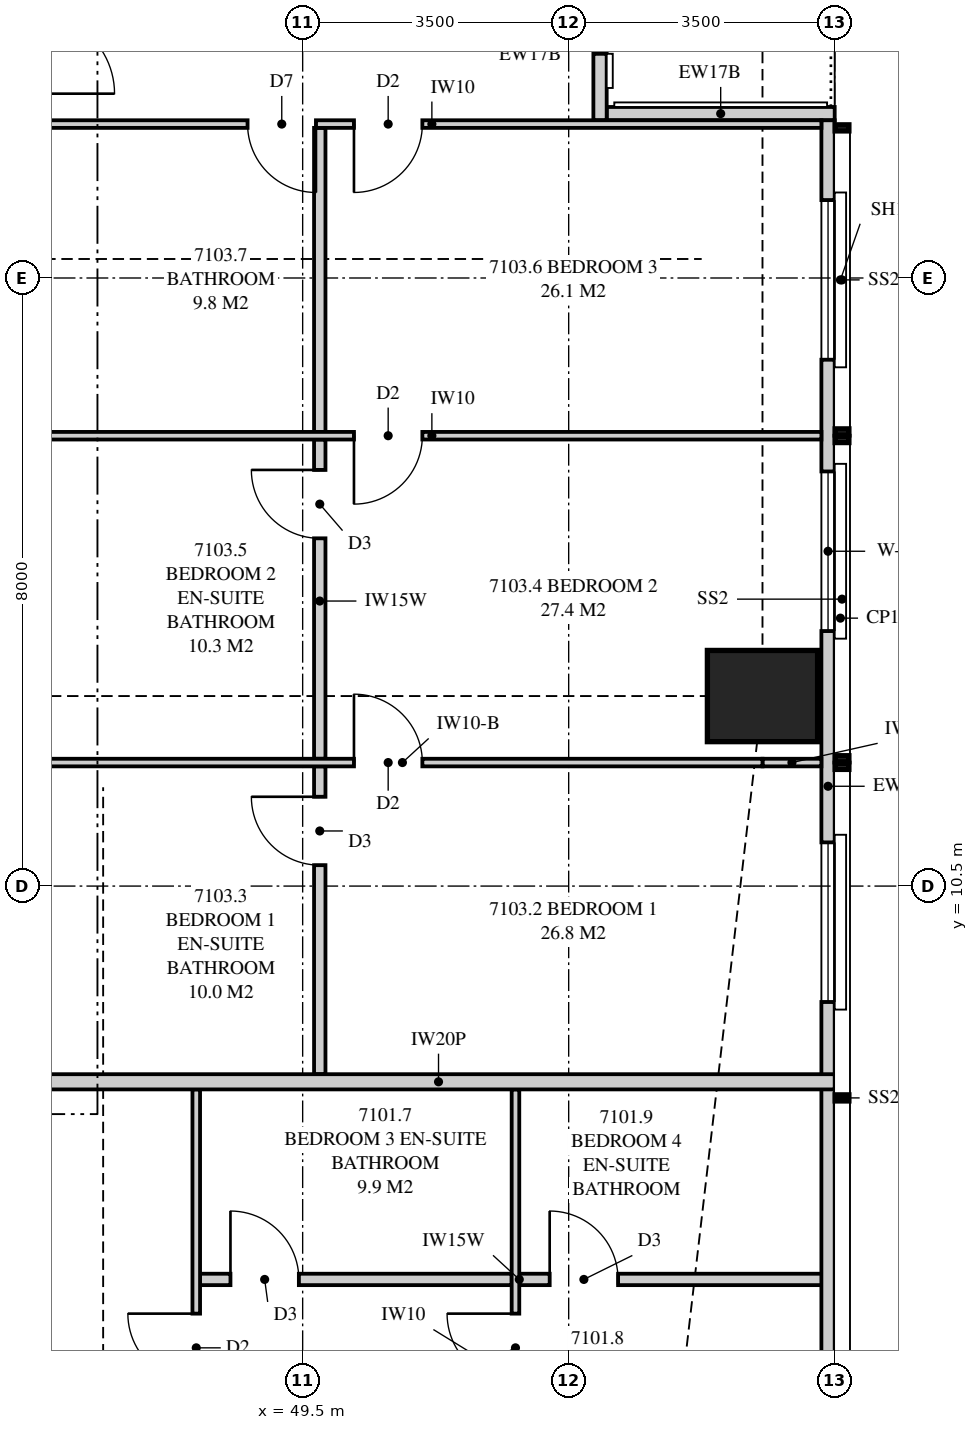
"""IFC4 building model, lengths in metres.
Left out: names, types, materials, properties, quantities, classifications, styles, units other than length and angle.
Written with IfcOpenShell. Run it as: python <this file> out.ifc"""

import sys

from ifc_helpers import new_model, si_unit, direction, frame, frame_2d, origin, origin_2d, place, context, subcontext, project, spatial, polyline, rectangle, outline, extrude, element, fill, save


model = new_model("IFC4")
c1 = context("Model", 3, precision=1e-05, world=origin(), true_north=direction((0.0, 1.0)))
c2 = subcontext(c1, "Body", "Model", "MODEL_VIEW")
j1 = project(units=[si_unit("LENGTHUNIT", "METRE"), si_unit("PLANEANGLEUNIT", "RADIAN")], contexts=[c1])
p1 = place(None, origin())
s1 = spatial("IfcSite", under=j1, at=p1, CompositionType="ELEMENT")
p2 = place(p1, origin())
s2 = spatial("IfcBuilding", under=s1, at=p2, CompositionType="ELEMENT")
p3 = place(p2, frame((0.0, 0.0, 259.95)))
s3 = spatial("IfcBuildingStorey", under=s2, at=p3, CompositionType="ELEMENT", Elevation=259.95)
p4 = place(p3, frame((55.55, 13.0, 0.0), z_axis=(0.0, 0.0, 1.0), x_axis=(1.0, 0.0, 0.0)))
e1 = element("IfcColumn", 1, at=p4, inside=s3, PredefinedType="COLUMN", context=c2, shape_type="SweptSolid", body=[
    extrude(rectangle(XDim=1.45, YDim=1.2, at=origin_2d()), origin(), (0.0, 0.0, 1.0), 3.9),
])
p5 = place(p3, frame((56.413, 3.051, 0.0), z_axis=(0.0, 0.0, 1.0), x_axis=(0.0, 1.0, 0.0)))
e2 = element("IfcWall", 2, at=p5, inside=s3, PredefinedType="SOLIDWALL", context=c2, shape_type="SweptSolid", body=[
    extrude(outline(polyline([(0.0, 0.0), (17.524, 0.0), (17.524, 2.7), (9.949, 2.7), (9.949, 3.66), (9.858, 3.66), (9.858, 2.7), (9.688, 2.7), (9.688, 3.66), (0.0, 3.66), (0.0, 0.0)])), frame((0.0, 0.087, 0.0), z_axis=(0.0, -1.0, 0.0), x_axis=(1.0, 0.0, 0.0)), (0.0, 0.0, 1.0), 0.175),
])
p6 = place(p5, frame((5.924, 0.0, 0.4)))
e3 = element("IfcOpeningElement", 3, at=p6, cuts=e2, PredefinedType="OPENING", context=c2, shape_type="SweptSolid", body=[
    extrude(rectangle(XDim=2.1, YDim=2.25, at=frame_2d((1.05, 1.125))), frame((0.0, 0.097, 0.0), z_axis=(0.0, -1.0, 0.0), x_axis=(1.0, 0.0, 0.0)), (0.0, 0.0, 1.0), 0.195),
])
p7 = place(p5, frame((10.804, 0.0, 0.4)))
e4 = element("IfcOpeningElement", 4, at=p7, cuts=e2, PredefinedType="OPENING", context=c2, shape_type="SweptSolid", body=[
    extrude(rectangle(XDim=2.1, YDim=2.25, at=frame_2d((1.05, 1.125))), frame((0.0, 0.097, 0.0), z_axis=(0.0, -1.0, 0.0), x_axis=(1.0, 0.0, 0.0)), (0.0, 0.0, 1.0), 0.195),
])
p8 = place(p5, frame((14.374, 0.0, 0.4)))
e5 = element("IfcOpeningElement", 5, at=p8, cuts=e2, PredefinedType="OPENING", context=c2, shape_type="SweptSolid", body=[
    extrude(rectangle(XDim=2.1, YDim=2.25, at=frame_2d((1.05, 1.125))), frame((0.0, 0.097, 0.0), z_axis=(0.0, -1.0, 0.0), x_axis=(1.0, 0.0, 0.0)), (0.0, 0.0, 1.0), 0.195),
])
p9 = place(p3, frame((53.413, 20.575, 0.0), z_axis=(0.0, 0.0, 1.0), x_axis=(0.0, 1.0, 0.0)))
e6 = element("IfcWall", 6, at=p9, inside=s3, PredefinedType="SOLIDWALL", context=c2, shape_type="SweptSolid", body=[
    extrude(outline(polyline([(0.0, 0.0), (3.55, 0.0), (3.55, 3.06), (3.225, 3.06), (3.225, 3.66), (0.0, 3.66), (0.0, 0.0)])), frame((0.0, 0.087, 0.0), z_axis=(0.0, -1.0, 0.0), x_axis=(1.0, 0.0, 0.0)), (0.0, 0.0, 1.0), 0.175),
])
p10 = place(p9, frame((0.875, 0.0, 0.0)))
e7 = element("IfcOpeningElement", 7, at=p10, cuts=e6, PredefinedType="OPENING", context=c2, shape_type="SweptSolid", body=[
    extrude(rectangle(XDim=1.8, YDim=2.4, at=frame_2d((0.9, 1.2))), frame((0.0, 0.097, 0.0), z_axis=(0.0, -1.0, 0.0), x_axis=(1.0, 0.0, 0.0)), (0.0, 0.0, 1.0), 0.195),
])
p11 = place(p3, frame((56.5, 20.663, 0.0), z_axis=(0.0, 0.0, 1.0), x_axis=(-1.0, 0.0, 0.0)))
e8 = element("IfcWall", 8, at=p11, inside=s3, PredefinedType="SOLIDWALL", context=c2, shape_type="SweptSolid", body=[
    extrude(outline(polyline([(0.0, 0.0), (3.0, 0.0), (3.0, 3.66), (1.75, 3.66), (1.75, 2.7), (0.15, 2.7), (0.15, 3.66), (0.0, 3.66), (0.0, 0.0)])), frame((0.0, 0.087, 0.0), z_axis=(0.0, -1.0, 0.0), x_axis=(1.0, 0.0, 0.0)), (0.0, 0.0, 1.0), 0.175),
])
p12 = place(p3, frame((48.1, 0.175, 0.0), z_axis=(0.0, 0.0, 1.0), x_axis=(0.0, 1.0, 0.0)))
e9 = element("IfcWall", 9, at=p12, inside=s3, PredefinedType="PARTITIONING", context=c2, shape_type="SweptSolid", body=[
    extrude(outline(polyline([(0.0, 0.0), (7.65, 0.0), (7.65, 3.66), (7.65, 3.06), (1.855, 3.06), (1.855, 2.7), (0.11, 2.7), (0.11, 3.66), (0.0, 3.66), (0.0, 0.0)])), frame((0.0, 0.05, 0.0), z_axis=(0.0, -1.0, 0.0), x_axis=(1.0, 0.0, 0.0)), (0.0, 0.0, 1.0), 0.1),
])
p13 = place(p12, frame((3.8, 0.0, 0.0)))
e10 = element("IfcOpeningElement", 10, at=p13, cuts=e9, PredefinedType="OPENING", context=c2, shape_type="SweptSolid", body=[
    extrude(rectangle(XDim=0.9, YDim=2.1, at=frame_2d((0.45, 1.05))), frame((0.0, 0.06, 0.0), z_axis=(0.0, -1.0, 0.0), x_axis=(1.0, 0.0, 0.0)), (0.0, 0.0, 1.0), 0.12),
])
p14 = place(p3, frame((52.3, 0.175, 0.0), z_axis=(0.0, 0.0, 1.0), x_axis=(0.0, 1.0, 0.0)))
e11 = element("IfcWall", 11, at=p14, inside=s3, PredefinedType="PARTITIONING", context=c2, shape_type="SweptSolid", body=[
    extrude(outline(polyline([(0.0, 0.0), (7.65, 0.0), (7.65, 3.66), (2.567, 3.66), (2.567, 2.7), (0.822, 2.7), (0.822, 3.66), (0.0, 3.66), (0.0, 0.0)])), frame((0.0, 0.05, 0.0), z_axis=(0.0, -1.0, 0.0), x_axis=(1.0, 0.0, 0.0)), (0.0, 0.0, 1.0), 0.1),
])
p15 = place(p14, frame((3.8, 0.0, 0.0)))
e12 = element("IfcOpeningElement", 12, at=p15, cuts=e11, PredefinedType="OPENING", context=c2, shape_type="SweptSolid", body=[
    extrude(rectangle(XDim=0.9, YDim=2.1, at=frame_2d((0.45, 1.05))), frame((0.0, 0.06, 0.0), z_axis=(0.0, -1.0, 0.0), x_axis=(1.0, 0.0, 0.0)), (0.0, 0.0, 1.0), 0.12),
])
p16 = place(p3, frame((48.15, 5.325, 0.0), z_axis=(0.0, 0.0, 1.0), x_axis=(1.0, 0.0, 0.0)))
e13 = element("IfcWall", 13, at=p16, inside=s3, PredefinedType="PLUMBINGWALL", context=c2, shape_type="SweptSolid", body=[
    extrude(outline(polyline([(0.0, 0.0), (4.1, 0.0), (4.1, 3.66), (0.01, 3.66), (0.01, 3.06), (0.0, 3.06), (0.0, 3.66), (0.0, 0.0)])), frame((0.0, 0.075, 0.0), z_axis=(0.0, -1.0, 0.0), x_axis=(1.0, 0.0, 0.0)), (0.0, 0.0, 1.0), 0.15),
])
p17 = place(p16, frame((0.4, 0.0, 0.0)))
e14 = element("IfcOpeningElement", 14, at=p17, cuts=e13, PredefinedType="OPENING", context=c2, shape_type="SweptSolid", body=[
    extrude(rectangle(XDim=0.9, YDim=2.1, at=frame_2d((0.45, 1.05))), frame((0.0, 0.085, 0.0), z_axis=(0.0, -1.0, 0.0), x_axis=(1.0, 0.0, 0.0)), (0.0, 0.0, 1.0), 0.17),
])
p18 = place(p3, frame((52.35, 5.325, 0.0), z_axis=(0.0, 0.0, 1.0), x_axis=(1.0, 0.0, 0.0)))
e15 = element("IfcWall", 15, at=p18, inside=s3, PredefinedType="PLUMBINGWALL", context=c2, shape_type="SweptSolid", body=[
    extrude(outline(polyline([(0.0, 0.0), (4.15, 0.0), (4.15, 3.66), (3.197, 3.66), (3.197, 2.7), (1.415, 2.7), (1.415, 3.66), (0.0, 3.66), (0.0, 0.0)])), frame((0.0, 0.075, 0.0), z_axis=(0.0, -1.0, 0.0), x_axis=(1.0, 0.0, 0.0)), (0.0, 0.0, 1.0), 0.15),
])
p19 = place(p18, frame((0.4, 0.0, 0.0)))
e16 = element("IfcOpeningElement", 16, at=p19, cuts=e15, PredefinedType="OPENING", context=c2, shape_type="SweptSolid", body=[
    extrude(rectangle(XDim=0.9, YDim=2.1, at=frame_2d((0.45, 1.05))), frame((0.0, 0.085, 0.0), z_axis=(0.0, -1.0, 0.0), x_axis=(1.0, 0.0, 0.0)), (0.0, 0.0, 1.0), 0.17),
])
p20 = place(p3, frame((46.075, 7.925, 0.0), z_axis=(0.0, 0.0, 1.0), x_axis=(1.0, 0.0, 0.0)))
e17 = element("IfcWall", 17, at=p20, inside=s3, PredefinedType="PARTITIONING", context=c2, shape_type="SweptSolid", body=[
    extrude(outline(polyline([(0.0, 0.0), (10.425, 0.0), (10.425, 3.66), (9.8, 3.66), (9.8, 2.7), (7.968, 2.7), (7.968, 3.66), (2.11, 3.66), (2.11, 3.06), (0.0, 3.06), (0.0, 3.66), (0.0, 0.0)])), frame((0.0, 0.1, 0.0), z_axis=(0.0, -1.0, 0.0), x_axis=(1.0, 0.0, 0.0)), (0.0, 0.0, 1.0), 0.2),
])
p21 = place(p3, frame((56.325, 12.125, 0.0), z_axis=(0.0, 0.0, 1.0), x_axis=(-1.0, 0.0, 0.0)))
e18 = element("IfcWall", 18, at=p21, inside=s3, PredefinedType="PARTITIONING", context=c2, shape_type="SweptSolid", body=[
    extrude(outline(polyline([(0.0, 0.0), (0.775, 0.0), (0.775, 2.7), (0.011, 2.7), (0.011, 3.66), (0.0, 3.66), (0.0, 0.0)])), frame((0.0, 0.05, 0.0), z_axis=(0.0, -1.0, 0.0), x_axis=(1.0, 0.0, 0.0)), (0.0, 0.0, 1.0), 0.1),
])
p22 = place(p3, frame((55.55, 12.125, 0.0), z_axis=(0.0, 0.0, 1.0), x_axis=(-1.0, 0.0, 0.0)))
e19 = element("IfcWall", 19, at=p22, inside=s3, PredefinedType="PARTITIONING", context=c2, shape_type="SweptSolid", body=[
    extrude(outline(polyline([(0.0, 0.0), (9.475, 0.0), (9.475, 3.06), (0.968, 3.06), (0.968, 2.7), (0.0, 2.7), (0.0, 0.0)])), frame((0.0, 0.05, 0.0), z_axis=(0.0, -1.0, 0.0), x_axis=(1.0, 0.0, 0.0)), (0.0, 0.0, 1.0), 0.1),
])
p23 = place(p22, frame((4.475, 0.0, 0.0)))
e20 = element("IfcOpeningElement", 20, at=p23, cuts=e19, PredefinedType="OPENING", context=c2, shape_type="SweptSolid", body=[
    extrude(rectangle(XDim=0.9, YDim=2.1, at=frame_2d((0.45, 1.05))), frame((0.0, 0.06, 0.0), z_axis=(0.0, -1.0, 0.0), x_axis=(1.0, 0.0, 0.0)), (0.0, 0.0, 1.0), 0.12),
])
p24 = place(p3, frame((56.325, 16.425, 0.0), z_axis=(0.0, 0.0, 1.0), x_axis=(-1.0, 0.0, 0.0)))
e21 = element("IfcWall", 21, at=p24, inside=s3, PredefinedType="PARTITIONING", context=c2, shape_type="SweptSolid", body=[
    extrude(outline(polyline([(0.0, 0.0), (10.25, 0.0), (10.25, 3.66), (1.635, 3.66), (1.635, 2.7), (0.0, 2.7), (0.0, 3.66), (0.0, 0.0)])), frame((0.0, 0.05, 0.0), z_axis=(0.0, -1.0, 0.0), x_axis=(1.0, 0.0, 0.0)), (0.0, 0.0, 1.0), 0.1),
])
p25 = place(p24, frame((5.25, 0.0, 0.0)))
e22 = element("IfcOpeningElement", 22, at=p25, cuts=e21, PredefinedType="OPENING", context=c2, shape_type="SweptSolid", body=[
    extrude(rectangle(XDim=0.9, YDim=2.1, at=frame_2d((0.45, 1.05))), frame((0.0, 0.06, 0.0), z_axis=(0.0, -1.0, 0.0), x_axis=(1.0, 0.0, 0.0)), (0.0, 0.0, 1.0), 0.12),
])
p26 = place(p3, frame((56.325, 20.525, 0.0), z_axis=(0.0, 0.0, 1.0), x_axis=(-1.0, 0.0, 0.0)))
e23 = element("IfcWall", 23, at=p26, inside=s3, PredefinedType="PARTITIONING", context=c2, shape_type="SweptSolid", body=[
    extrude(outline(polyline([(0.0, 0.0), (10.25, 0.0), (10.25, 3.66), (1.635, 3.66), (1.635, 2.7), (0.0, 2.7), (0.0, 3.66), (0.0, 0.0)])), frame((0.0, 0.05, 0.0), z_axis=(0.0, -1.0, 0.0), x_axis=(1.0, 0.0, 0.0)), (0.0, 0.0, 1.0), 0.1),
])
p27 = place(p26, frame((5.25, 0.0, 0.0)))
e24 = element("IfcOpeningElement", 24, at=p27, cuts=e23, PredefinedType="OPENING", context=c2, shape_type="SweptSolid", body=[
    extrude(rectangle(XDim=0.9, YDim=2.1, at=frame_2d((0.45, 1.05))), frame((0.0, 0.06, 0.0), z_axis=(0.0, -1.0, 0.0), x_axis=(1.0, 0.0, 0.0)), (0.0, 0.0, 1.0), 0.12),
])
p28 = place(p26, frame((6.65, 0.0, 0.0)))
e25 = element("IfcOpeningElement", 25, at=p28, cuts=e23, PredefinedType="OPENING", context=c2, shape_type="SweptSolid", body=[
    extrude(rectangle(XDim=0.9, YDim=2.1, at=frame_2d((0.45, 1.05))), frame((0.0, 0.06, 0.0), z_axis=(0.0, -1.0, 0.0), x_axis=(1.0, 0.0, 0.0)), (0.0, 0.0, 1.0), 0.12),
])
p29 = place(p3, frame((49.725, 8.025, 0.0), z_axis=(0.0, 0.0, 1.0), x_axis=(0.0, 1.0, 0.0)))
e26 = element("IfcWall", 26, at=p29, inside=s3, PredefinedType="PLUMBINGWALL", context=c2, shape_type="SweptSolid", body=[
    extrude(outline(polyline([(0.0, 0.0), (4.05, 0.0), (4.05, 3.66), (4.05, 3.06), (3.69, 3.06), (3.69, 3.66), (0.0, 3.66), (0.0, 0.0)])), frame((0.0, 0.075, 0.0), z_axis=(0.0, -1.0, 0.0), x_axis=(1.0, 0.0, 0.0)), (0.0, 0.0, 1.0), 0.15),
])
p30 = place(p29, frame((2.75, 0.0, 0.0)))
e27 = element("IfcOpeningElement", 27, at=p30, cuts=e26, PredefinedType="OPENING", context=c2, shape_type="SweptSolid", body=[
    extrude(rectangle(XDim=0.9, YDim=2.1, at=frame_2d((0.45, 1.05))), frame((0.0, 0.085, 0.0), z_axis=(0.0, -1.0, 0.0), x_axis=(1.0, 0.0, 0.0)), (0.0, 0.0, 1.0), 0.17),
])
p31 = place(p3, frame((49.725, 12.175, 0.0), z_axis=(0.0, 0.0, 1.0), x_axis=(0.0, 1.0, 0.0)))
e28 = element("IfcWall", 28, at=p31, inside=s3, PredefinedType="PLUMBINGWALL", context=c2, shape_type="SweptSolid", body=[
    extrude(outline(polyline([(0.0, 0.0), (4.2, 0.0), (4.2, 3.66), (2.11, 3.66), (2.11, 3.06), (0.0, 3.06), (0.0, 3.66), (0.0, 0.0)])), frame((0.0, 0.075, 0.0), z_axis=(0.0, -1.0, 0.0), x_axis=(1.0, 0.0, 0.0)), (0.0, 0.0, 1.0), 0.15),
])
p32 = place(p31, frame((2.9, 0.0, 0.0)))
e29 = element("IfcOpeningElement", 29, at=p32, cuts=e28, PredefinedType="OPENING", context=c2, shape_type="SweptSolid", body=[
    extrude(rectangle(XDim=0.9, YDim=2.1, at=frame_2d((0.45, 1.05))), frame((0.0, 0.085, 0.0), z_axis=(0.0, -1.0, 0.0), x_axis=(1.0, 0.0, 0.0)), (0.0, 0.0, 1.0), 0.17),
])
p33 = place(p3, frame((49.725, 16.475, 0.0), z_axis=(0.0, 0.0, 1.0), x_axis=(0.0, 1.0, 0.0)))
e30 = element("IfcWall", 30, at=p33, inside=s3, PredefinedType="PLUMBINGWALL", context=c2, shape_type="SweptSolid", body=[
    extrude(outline(polyline([(0.0, 0.0), (4.0, 0.0), (4.0, 3.66), (3.56, 3.66), (3.56, 3.06), (0.99, 3.06), (0.99, 3.66), (0.0, 3.66), (0.0, 0.0)])), frame((0.0, 0.075, 0.0), z_axis=(0.0, -1.0, 0.0), x_axis=(1.0, 0.0, 0.0)), (0.0, 0.0, 1.0), 0.15),
])
p34 = place(p6, origin())
e31 = element("IfcWindow", 31, at=p34, inside=s3, PartitioningType="SINGLE_PANEL", PredefinedType="WINDOW", context=c2, shape_type="SweptSolid", body=[
    extrude(rectangle(XDim=2.1, YDim=2.25, at=frame_2d((1.05, 1.125))), frame((0.0, 0.03, 0.0), z_axis=(0.0, -1.0, 0.0), x_axis=(1.0, 0.0, 0.0)), (0.0, 0.0, 1.0), 0.06),
])
fill(e3, e31)
p35 = place(p7, origin())
e32 = element("IfcWindow", 32, at=p35, inside=s3, PartitioningType="SINGLE_PANEL", PredefinedType="WINDOW", context=c2, shape_type="SweptSolid", body=[
    extrude(rectangle(XDim=2.1, YDim=2.25, at=frame_2d((1.05, 1.125))), frame((0.0, 0.03, 0.0), z_axis=(0.0, -1.0, 0.0), x_axis=(1.0, 0.0, 0.0)), (0.0, 0.0, 1.0), 0.06),
])
fill(e4, e32)
p36 = place(p8, origin())
e33 = element("IfcWindow", 33, at=p36, inside=s3, PartitioningType="SINGLE_PANEL", PredefinedType="WINDOW", context=c2, shape_type="SweptSolid", body=[
    extrude(rectangle(XDim=2.1, YDim=2.25, at=frame_2d((1.05, 1.125))), frame((0.0, 0.03, 0.0), z_axis=(0.0, -1.0, 0.0), x_axis=(1.0, 0.0, 0.0)), (0.0, 0.0, 1.0), 0.06),
])
fill(e5, e33)
p37 = place(p10, origin())
e34 = element("IfcDoor", 34, at=p37, inside=s3, OperationType="SLIDING_TO_LEFT", PredefinedType="DOOR", context=c2, shape_type="SweptSolid", body=[
    extrude(rectangle(XDim=1.8, YDim=2.4, at=frame_2d((0.9, 1.2))), frame((0.0, 0.025, 0.0), z_axis=(0.0, -1.0, 0.0), x_axis=(1.0, 0.0, 0.0)), (0.0, 0.0, 1.0), 0.05),
])
fill(e7, e34)
p38 = place(p13, origin())
e35 = element("IfcDoor", 35, at=p38, inside=s3, OperationType="SINGLE_SWING_RIGHT", PredefinedType="DOOR", context=c2, shape_type="SweptSolid", body=[
    extrude(rectangle(XDim=0.9, YDim=2.1, at=frame_2d((0.45, 1.05))), frame((0.0, 0.025, 0.0), z_axis=(0.0, -1.0, 0.0), x_axis=(1.0, 0.0, 0.0)), (0.0, 0.0, 1.0), 0.05),
])
fill(e10, e35)
p39 = place(p17, origin())
e36 = element("IfcDoor", 36, at=p39, inside=s3, OperationType="SINGLE_SWING_LEFT", PredefinedType="DOOR", context=c2, shape_type="SweptSolid", body=[
    extrude(rectangle(XDim=0.9, YDim=2.1, at=frame_2d((0.45, 1.05))), frame((0.0, 0.025, 0.0), z_axis=(0.0, -1.0, 0.0), x_axis=(1.0, 0.0, 0.0)), (0.0, 0.0, 1.0), 0.05),
])
fill(e14, e36)
p40 = place(p15, origin())
e37 = element("IfcDoor", 37, at=p40, inside=s3, OperationType="SINGLE_SWING_RIGHT", PredefinedType="DOOR", context=c2, shape_type="SweptSolid", body=[
    extrude(rectangle(XDim=0.9, YDim=2.1, at=frame_2d((0.45, 1.05))), frame((0.0, 0.025, 0.0), z_axis=(0.0, -1.0, 0.0), x_axis=(1.0, 0.0, 0.0)), (0.0, 0.0, 1.0), 0.05),
])
fill(e12, e37)
p41 = place(p19, origin())
e38 = element("IfcDoor", 38, at=p41, inside=s3, OperationType="SINGLE_SWING_LEFT", PredefinedType="DOOR", context=c2, shape_type="SweptSolid", body=[
    extrude(rectangle(XDim=0.9, YDim=2.1, at=frame_2d((0.45, 1.05))), frame((0.0, 0.025, 0.0), z_axis=(0.0, -1.0, 0.0), x_axis=(1.0, 0.0, 0.0)), (0.0, 0.0, 1.0), 0.05),
])
fill(e16, e38)
p42 = place(p23, frame((0.9, 0.0, 0.0), z_axis=(0.0, 0.0, 1.0), x_axis=(-1.0, 0.0, 0.0)))
e39 = element("IfcDoor", 39, at=p42, inside=s3, OperationType="SINGLE_SWING_LEFT", PredefinedType="DOOR", context=c2, shape_type="SweptSolid", body=[
    extrude(rectangle(XDim=0.9, YDim=2.1, at=frame_2d((0.45, 1.05))), frame((0.0, 0.025, 0.0), z_axis=(0.0, -1.0, 0.0), x_axis=(1.0, 0.0, 0.0)), (0.0, 0.0, 1.0), 0.05),
])
fill(e20, e39)
p43 = place(p30, origin())
e40 = element("IfcDoor", 40, at=p43, inside=s3, OperationType="SINGLE_SWING_RIGHT", PredefinedType="DOOR", context=c2, shape_type="SweptSolid", body=[
    extrude(rectangle(XDim=0.9, YDim=2.1, at=frame_2d((0.45, 1.05))), frame((0.0, 0.025, 0.0), z_axis=(0.0, -1.0, 0.0), x_axis=(1.0, 0.0, 0.0)), (0.0, 0.0, 1.0), 0.05),
])
fill(e27, e40)
p44 = place(p25, origin())
e41 = element("IfcDoor", 41, at=p44, inside=s3, OperationType="SINGLE_SWING_RIGHT", PredefinedType="DOOR", context=c2, shape_type="SweptSolid", body=[
    extrude(rectangle(XDim=0.9, YDim=2.1, at=frame_2d((0.45, 1.05))), frame((0.0, 0.025, 0.0), z_axis=(0.0, -1.0, 0.0), x_axis=(1.0, 0.0, 0.0)), (0.0, 0.0, 1.0), 0.05),
])
fill(e22, e41)
p45 = place(p32, origin())
e42 = element("IfcDoor", 42, at=p45, inside=s3, OperationType="SINGLE_SWING_RIGHT", PredefinedType="DOOR", context=c2, shape_type="SweptSolid", body=[
    extrude(rectangle(XDim=0.9, YDim=2.1, at=frame_2d((0.45, 1.05))), frame((0.0, 0.025, 0.0), z_axis=(0.0, -1.0, 0.0), x_axis=(1.0, 0.0, 0.0)), (0.0, 0.0, 1.0), 0.05),
])
fill(e29, e42)
p46 = place(p27, origin())
e43 = element("IfcDoor", 43, at=p46, inside=s3, OperationType="SINGLE_SWING_RIGHT", PredefinedType="DOOR", context=c2, shape_type="SweptSolid", body=[
    extrude(rectangle(XDim=0.9, YDim=2.1, at=frame_2d((0.45, 1.05))), frame((0.0, 0.025, 0.0), z_axis=(0.0, -1.0, 0.0), x_axis=(1.0, 0.0, 0.0)), (0.0, 0.0, 1.0), 0.05),
])
fill(e24, e43)
p47 = place(p28, origin())
e44 = element("IfcDoor", 44, at=p47, inside=s3, OperationType="SINGLE_SWING_LEFT", PredefinedType="DOOR", context=c2, shape_type="SweptSolid", body=[
    extrude(rectangle(XDim=0.9, YDim=2.1, at=frame_2d((0.45, 1.05))), frame((0.0, 0.025, 0.0), z_axis=(0.0, -1.0, 0.0), x_axis=(1.0, 0.0, 0.0)), (0.0, 0.0, 1.0), 0.05),
])
fill(e25, e44)
save(model, sys.argv[1])
